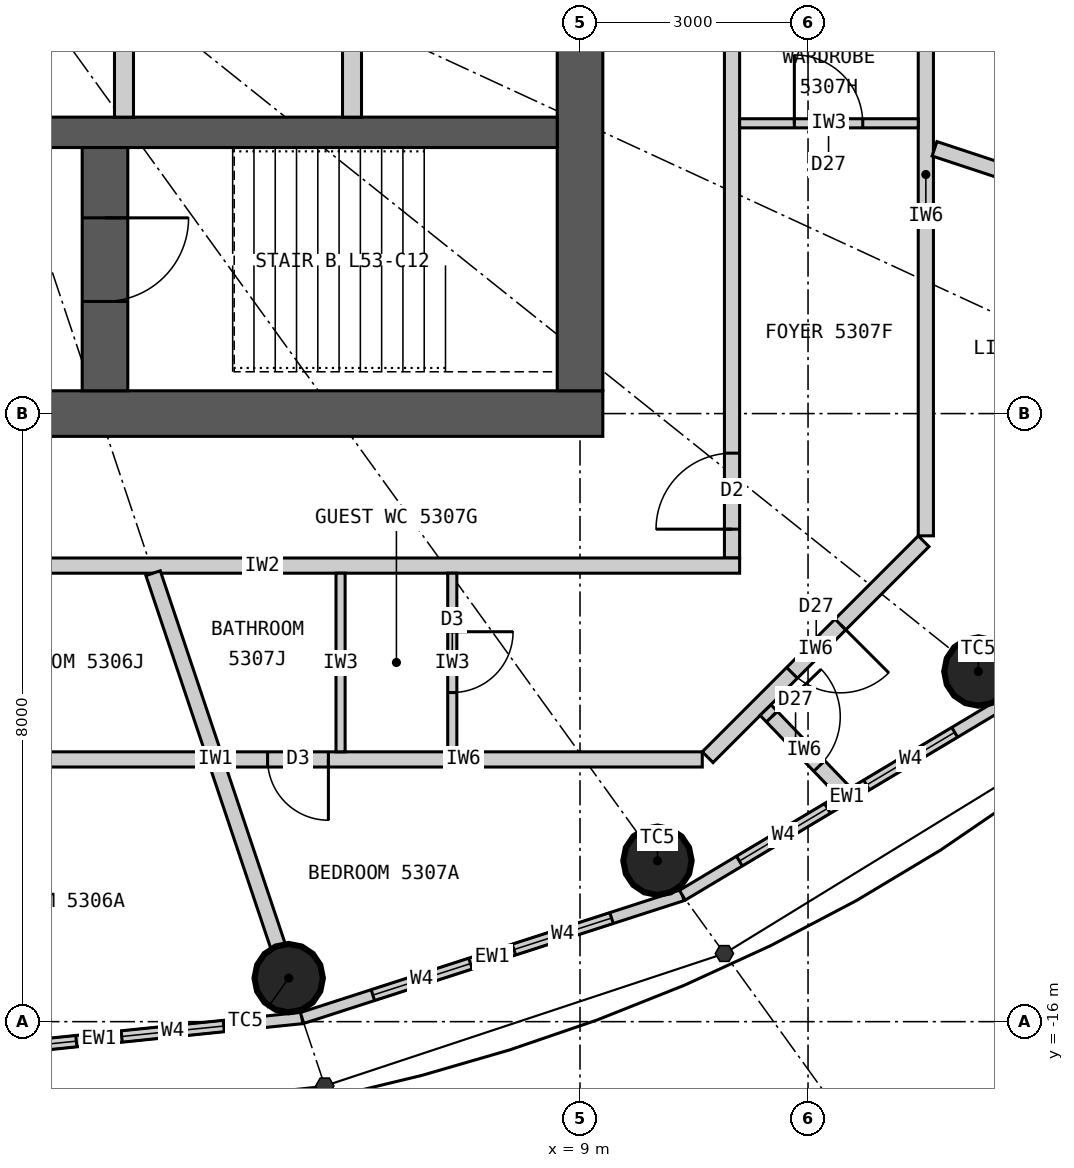
"""IFC4 building model, lengths in metres.
Left out: names, types, materials, properties, quantities, classifications, styles, units other than length and angle.
Written with IfcOpenShell. Run it as: python <this file> out.ifc"""

import sys

from ifc_helpers import new_model, si_unit, direction, frame, frame_2d, origin, origin_2d, place, context, subcontext, project, spatial, rectangle, circle, extrude, element, fill, save


model = new_model("IFC4")
c1 = context("Model", 3, precision=1e-05, world=origin(), true_north=direction((0.0, 1.0)))
c2 = subcontext(c1, "Body", "Model", "MODEL_VIEW")
j1 = project(units=[si_unit("LENGTHUNIT", "METRE"), si_unit("PLANEANGLEUNIT", "RADIAN")], contexts=[c1])
p1 = place(None, origin())
s1 = spatial("IfcSite", under=j1, at=p1, CompositionType="ELEMENT")
p2 = place(p1, origin())
s2 = spatial("IfcBuilding", under=s1, at=p2, CompositionType="ELEMENT")
p3 = place(p2, frame((0.0, 0.0, 199.5)))
s3 = spatial("IfcBuildingStorey", under=s2, at=p3, CompositionType="ELEMENT", Elevation=199.5)
for number, where, z_axis, x_axis in (
    (1, (5.167, -15.427, 0.0), (0.0, 0.0, 1.0), (1.0, 0.0, 0.0)),
    (2, (10.019, -13.883, 0.0), (0.0, 0.0, 1.0), (1.0, 0.0, 0.0)),
    (3, (14.241, -11.393, 0.0), (0.0, 0.0, 1.0), (1.0, 0.0, 0.0)),
):
    element("IfcColumn", number, at=place(p3, frame(where, z_axis=z_axis, x_axis=x_axis)), inside=s3, PredefinedType="COLUMN", context=c2, shape_type="SweptSolid", body=[
        extrude(circle(Radius=0.45, at=origin_2d()), origin(), (0.0, 0.0, 1.0), 3.3),
    ])
p4 = place(p3, frame((9.3, -8.0, 0.0), z_axis=(0.0, 0.0, 1.0), x_axis=(-1.0, 0.0, 0.0)))
e4 = element("IfcWall", 4, at=p4, inside=s3, PredefinedType="SHEAR", context=c2, shape_type="SweptSolid", body=[
    extrude(rectangle(XDim=18.6, YDim=0.6, at=frame_2d((9.3, 0.0))), origin(), (0.0, 0.0, 1.0), 3.3),
])
p5 = place(p4, frame((8.0, 0.0, 0.0)))
e5 = element("IfcOpeningElement", 5, at=p5, cuts=e4, PredefinedType="OPENING", context=c2, shape_type="SweptSolid", body=[
    extrude(rectangle(XDim=1.2, YDim=2.2, at=frame_2d((0.6, 1.1))), frame((0.0, 0.31, 0.0), z_axis=(0.0, -1.0, 0.0), x_axis=(1.0, 0.0, 0.0)), (0.0, 0.0, 1.0), 0.62),
])
p6 = place(p4, frame((15.6, 0.0, 0.0)))
e6 = element("IfcOpeningElement", 6, at=p6, cuts=e4, PredefinedType="OPENING", context=c2, shape_type="SweptSolid", body=[
    extrude(rectangle(XDim=0.9, YDim=2.2, at=frame_2d((0.45, 1.1))), frame((0.0, 0.31, 0.0), z_axis=(0.0, -1.0, 0.0), x_axis=(1.0, 0.0, 0.0)), (0.0, 0.0, 1.0), 0.62),
])
p7 = place(p3, frame((9.0, -7.7, 0.0), z_axis=(0.0, 0.0, 1.0), x_axis=(0.0, 1.0, 0.0)))
e7 = element("IfcWall", 7, at=p7, inside=s3, PredefinedType="SHEAR", context=c2, shape_type="SweptSolid", body=[
    extrude(rectangle(XDim=15.4, YDim=0.6, at=frame_2d((7.7, 0.0))), origin(), (0.0, 0.0, 1.0), 3.3),
])
p8 = place(p7, frame((6.8, 0.0, 0.0)))
e8 = element("IfcOpeningElement", 8, at=p8, cuts=e7, PredefinedType="OPENING", context=c2, shape_type="SweptSolid", body=[
    extrude(rectangle(XDim=1.8, YDim=2.2, at=frame_2d((0.9, 1.1))), frame((0.0, 0.31, 0.0), z_axis=(0.0, -1.0, 0.0), x_axis=(1.0, 0.0, 0.0)), (0.0, 0.0, 1.0), 0.62),
])
p9 = place(p3, frame((-8.7, -4.3, 0.0), z_axis=(0.0, 0.0, 1.0), x_axis=(1.0, 0.0, 0.0)))
e9 = element("IfcWall", 9, at=p9, inside=s3, PredefinedType="SHEAR", context=c2, shape_type="SweptSolid", body=[
    extrude(rectangle(XDim=17.4, YDim=0.4, at=frame_2d((8.7, 0.0))), origin(), (0.0, 0.0, 1.0), 3.3),
])
p10 = place(p3, frame((2.75, -7.7, 0.0), z_axis=(0.0, 0.0, 1.0), x_axis=(0.0, 1.0, 0.0)))
e10 = element("IfcWall", 10, at=p10, inside=s3, PredefinedType="SHEAR", context=c2, shape_type="SweptSolid", body=[
    extrude(rectangle(XDim=3.2, YDim=0.6, at=frame_2d((1.6, 0.0))), origin(), (0.0, 0.0, 1.0), 3.3),
])
p11 = place(p10, frame((1.175, 0.0, 0.0)))
e11 = element("IfcOpeningElement", 11, at=p11, cuts=e10, PredefinedType="OPENING", context=c2, shape_type="SweptSolid", body=[
    extrude(rectangle(XDim=1.1, YDim=2.2, at=frame_2d((0.55, 1.1))), frame((0.0, 0.31, 0.0), z_axis=(0.0, -1.0, 0.0), x_axis=(1.0, 0.0, 0.0)), (0.0, 0.0, 1.0), 0.62),
])
for number, where, z_axis, x_axis in (
    (12, (3.0, -4.1, 0.0), (0.0, 0.0, 1.0), (0.0, 1.0, 0.0)),
    (13, (6.0, -4.1, 0.0), (0.0, 0.0, 1.0), (0.0, 1.0, 0.0)),
):
    element("IfcWall", number, at=place(p3, frame(where, z_axis=z_axis, x_axis=x_axis)), inside=s3, PredefinedType="PARTITIONING", context=c2, shape_type="SweptSolid", body=[
        extrude(rectangle(XDim=2.35, YDim=0.25, at=frame_2d((1.175, 0.0))), origin(), (0.0, 0.0, 1.0), 3.3),
    ])
p12 = place(p3, frame((0.0, -16.5, 0.0), z_axis=(0.0, 0.0, 1.0), x_axis=(0.994774574972, 0.102095763818, 0.0)))
e14 = element("IfcWall", 14, at=p12, inside=s3, PredefinedType="ELEMENTEDWALL", context=c2, shape_type="SweptSolid", body=[
    extrude(rectangle(XDim=5.371, YDim=0.15, at=frame_2d((2.686, 0.0))), origin(), (0.0, 0.0, 1.0), 3.12),
])
p13 = place(p12, frame((1.035, 0.0, 0.9)))
e15 = element("IfcOpeningElement", 15, at=p13, cuts=e14, PredefinedType="OPENING", context=c2, shape_type="SweptSolid", body=[
    extrude(rectangle(XDim=1.35, YDim=1.9, at=frame_2d((0.675, 0.95))), frame((0.0, 0.085, 0.0), z_axis=(0.0, -1.0, 0.0), x_axis=(1.0, 0.0, 0.0)), (0.0, 0.0, 1.0), 0.17),
])
p14 = place(p12, frame((2.985, 0.0, 0.9)))
e16 = element("IfcOpeningElement", 16, at=p14, cuts=e14, PredefinedType="OPENING", context=c2, shape_type="SweptSolid", body=[
    extrude(rectangle(XDim=1.35, YDim=1.9, at=frame_2d((0.675, 0.95))), frame((0.0, 0.085, 0.0), z_axis=(0.0, -1.0, 0.0), x_axis=(1.0, 0.0, 0.0)), (0.0, 0.0, 1.0), 0.17),
])
p15 = place(p3, frame((5.343, -15.952, 0.0), z_axis=(0.0, 0.0, 1.0), x_axis=(0.951644702515, 0.307200846638, 0.0)))
e17 = element("IfcWall", 17, at=p15, inside=s3, PredefinedType="ELEMENTEDWALL", context=c2, shape_type="SweptSolid", body=[
    extrude(rectangle(XDim=5.258, YDim=0.15, at=frame_2d((2.629, 0.0))), origin(), (0.0, 0.0, 1.0), 3.12),
])
p16 = place(p15, frame((0.979, 0.0, 0.9)))
e18 = element("IfcOpeningElement", 18, at=p16, cuts=e17, PredefinedType="OPENING", context=c2, shape_type="SweptSolid", body=[
    extrude(rectangle(XDim=1.35, YDim=1.9, at=frame_2d((0.675, 0.95))), frame((0.0, 0.085, 0.0), z_axis=(0.0, -1.0, 0.0), x_axis=(1.0, 0.0, 0.0)), (0.0, 0.0, 1.0), 0.17),
])
p17 = place(p15, frame((2.929, 0.0, 0.9)))
e19 = element("IfcOpeningElement", 19, at=p17, cuts=e17, PredefinedType="OPENING", context=c2, shape_type="SweptSolid", body=[
    extrude(rectangle(XDim=1.35, YDim=1.9, at=frame_2d((0.675, 0.95))), frame((0.0, 0.085, 0.0), z_axis=(0.0, -1.0, 0.0), x_axis=(1.0, 0.0, 0.0)), (0.0, 0.0, 1.0), 0.17),
])
p18 = place(p3, frame((10.346, -14.336, 0.0), z_axis=(0.0, 0.0, 1.0), x_axis=(0.85822150553, 0.513279502265, 0.0)))
e20 = element("IfcWall", 20, at=p18, inside=s3, PredefinedType="ELEMENTEDWALL", context=c2, shape_type="SweptSolid", body=[
    extrude(rectangle(XDim=5.05, YDim=0.15, at=frame_2d((2.525, 0.0))), origin(), (0.0, 0.0, 1.0), 3.12),
])
p19 = place(p18, frame((0.875, 0.0, 0.9)))
e21 = element("IfcOpeningElement", 21, at=p19, cuts=e20, PredefinedType="OPENING", context=c2, shape_type="SweptSolid", body=[
    extrude(rectangle(XDim=1.35, YDim=1.9, at=frame_2d((0.675, 0.95))), frame((0.0, 0.085, 0.0), z_axis=(0.0, -1.0, 0.0), x_axis=(1.0, 0.0, 0.0)), (0.0, 0.0, 1.0), 0.17),
])
p20 = place(p18, frame((2.825, 0.0, 0.9)))
e22 = element("IfcOpeningElement", 22, at=p20, cuts=e20, PredefinedType="OPENING", context=c2, shape_type="SweptSolid", body=[
    extrude(rectangle(XDim=1.35, YDim=1.9, at=frame_2d((0.675, 0.95))), frame((0.0, 0.085, 0.0), z_axis=(0.0, -1.0, 0.0), x_axis=(1.0, 0.0, 0.0)), (0.0, 0.0, 1.0), 0.17),
])
p21 = place(p3, frame((11.0, -9.9, 0.0), z_axis=(0.0, 0.0, 1.0), x_axis=(0.0, 1.0, 0.0)))
e23 = element("IfcWall", 23, at=p21, inside=s3, PredefinedType="PARTITIONING", context=c2, shape_type="SweptSolid", body=[
    extrude(rectangle(XDim=19.8, YDim=0.2, at=frame_2d((9.9, 0.0))), origin(), (0.0, 0.0, 1.0), 3.12),
])
p22 = place(p21, frame((10.32, 0.0, 0.0)))
e24 = element("IfcOpeningElement", 24, at=p22, cuts=e23, PredefinedType="OPENING", context=c2, shape_type="SweptSolid", body=[
    extrude(rectangle(XDim=1.0, YDim=2.2, at=frame_2d((0.5, 1.1))), frame((0.0, 0.11, 0.0), z_axis=(0.0, -1.0, 0.0), x_axis=(1.0, 0.0, 0.0)), (0.0, 0.0, 1.0), 0.22),
])
p23 = place(p21, frame((18.653, 0.0, 0.0)))
e25 = element("IfcOpeningElement", 25, at=p23, cuts=e23, PredefinedType="OPENING", context=c2, shape_type="SweptSolid", body=[
    extrude(rectangle(XDim=1.0, YDim=2.2, at=frame_2d((0.5, 1.1))), frame((0.0, 0.11, 0.0), z_axis=(0.0, -1.0, 0.0), x_axis=(1.0, 0.0, 0.0)), (0.0, 0.0, 1.0), 0.22),
])
p24 = place(p21, frame((0.379, 0.0, 0.0)))
e26 = element("IfcOpeningElement", 26, at=p24, cuts=e23, PredefinedType="OPENING", context=c2, shape_type="SweptSolid", body=[
    extrude(rectangle(XDim=1.0, YDim=2.2, at=frame_2d((0.5, 1.1))), frame((0.0, 0.11, 0.0), z_axis=(0.0, -1.0, 0.0), x_axis=(1.0, 0.0, 0.0)), (0.0, 0.0, 1.0), 0.22),
])
p25 = place(p3, frame((11.1, -10.0, 0.0), z_axis=(0.0, 0.0, 1.0), x_axis=(-1.0, 0.0, 0.0)))
e27 = element("IfcWall", 27, at=p25, inside=s3, PredefinedType="PARTITIONING", context=c2, shape_type="SweptSolid", body=[
    extrude(rectangle(XDim=12.559, YDim=0.2, at=frame_2d((6.28, 0.0))), origin(), (0.0, 0.0, 1.0), 3.12),
])
p26 = place(p3, frame((3.383, -10.1, 0.0), z_axis=(0.0, 0.0, 1.0), x_axis=(0.317602151035, -0.948224063003, 0.0)))
e28 = element("IfcWall", 28, at=p26, inside=s3, PredefinedType="PARTITIONING", context=c2, shape_type="SweptSolid", body=[
    extrude(rectangle(XDim=5.168, YDim=0.2, at=frame_2d((2.584, 0.0))), origin(), (0.0, 0.0, 1.0), 2.42),
])
p27 = place(p3, frame((-6.364, -12.55, 0.0), z_axis=(0.0, 0.0, 1.0), x_axis=(1.0, 0.0, 0.0)))
e29 = element("IfcWall", 29, at=p27, inside=s3, PredefinedType="PARTITIONING", context=c2, shape_type="SweptSolid", body=[
    extrude(rectangle(XDim=10.446, YDim=0.2, at=frame_2d((5.223, 0.0))), origin(), (0.0, 0.0, 1.0), 3.12),
])
p28 = place(p27, frame((7.202, 0.0, 0.0)))
e30 = element("IfcOpeningElement", 30, at=p28, cuts=e29, PredefinedType="OPENING", context=c2, shape_type="SweptSolid", body=[
    extrude(rectangle(XDim=0.8, YDim=2.1, at=frame_2d((0.4, 1.05))), frame((0.0, 0.11, 0.0), z_axis=(0.0, -1.0, 0.0), x_axis=(1.0, 0.0, 0.0)), (0.0, 0.0, 1.0), 0.22),
])
p29 = place(p27, frame((3.895, 0.0, 0.0)))
e31 = element("IfcOpeningElement", 31, at=p29, cuts=e29, PredefinedType="OPENING", context=c2, shape_type="SweptSolid", body=[
    extrude(rectangle(XDim=0.9, YDim=2.1, at=frame_2d((0.45, 1.05))), frame((0.0, 0.11, 0.0), z_axis=(0.0, -1.0, 0.0), x_axis=(1.0, 0.0, 0.0)), (0.0, 0.0, 1.0), 0.22),
])
p30 = place(p3, frame((4.325, -12.55, 0.0), z_axis=(0.0, 0.0, 1.0), x_axis=(1.0, 0.0, 0.0)))
e32 = element("IfcWall", 32, at=p30, inside=s3, PredefinedType="PARTITIONING", context=c2, shape_type="SweptSolid", body=[
    extrude(rectangle(XDim=6.284, YDim=0.2, at=frame_2d((3.142, 0.0))), origin(), (0.0, 0.0, 1.0), 3.12),
])
p31 = place(p30, frame((0.564, 0.0, 0.0)))
e33 = element("IfcOpeningElement", 33, at=p31, cuts=e32, PredefinedType="OPENING", context=c2, shape_type="SweptSolid", body=[
    extrude(rectangle(XDim=0.8, YDim=2.1, at=frame_2d((0.4, 1.05))), frame((0.0, 0.11, 0.0), z_axis=(0.0, -1.0, 0.0), x_axis=(1.0, 0.0, 0.0)), (0.0, 0.0, 1.0), 0.22),
])
p32 = place(p3, frame((10.679, -12.521, 0.0), z_axis=(0.0, 0.0, 1.0), x_axis=(0.707106781187, 0.707106781187, 0.0)))
e34 = element("IfcWall", 34, at=p32, inside=s3, PredefinedType="PARTITIONING", context=c2, shape_type="SweptSolid", body=[
    extrude(rectangle(XDim=4.019, YDim=0.2, at=frame_2d((2.009, 0.0))), origin(), (0.0, 0.0, 1.0), 3.12),
])
p33 = place(p32, frame((1.57, 0.0, 0.0)))
e35 = element("IfcOpeningElement", 35, at=p33, cuts=e34, PredefinedType="OPENING", context=c2, shape_type="SweptSolid", body=[
    extrude(rectangle(XDim=0.9, YDim=2.1, at=frame_2d((0.45, 1.05))), frame((0.0, 0.11, 0.0), z_axis=(0.0, -1.0, 0.0), x_axis=(1.0, 0.0, 0.0)), (0.0, 0.0, 1.0), 0.22),
])
p34 = place(p3, frame((13.55, -9.609, 0.0), z_axis=(0.0, 0.0, 1.0), x_axis=(0.0, 1.0, 0.0)))
e36 = element("IfcWall", 36, at=p34, inside=s3, PredefinedType="PARTITIONING", context=c2, shape_type="SweptSolid", body=[
    extrude(rectangle(XDim=9.508, YDim=0.2, at=frame_2d((4.754, 0.0))), origin(), (0.0, 0.0, 1.0), 3.12),
])
p35 = place(p34, frame((7.308, 0.0, 0.0)))
e37 = element("IfcOpeningElement", 37, at=p35, cuts=e36, PredefinedType="OPENING", context=c2, shape_type="SweptSolid", body=[
    extrude(rectangle(XDim=0.8, YDim=2.1, at=frame_2d((0.4, 1.05))), frame((0.0, 0.11, 0.0), z_axis=(0.0, -1.0, 0.0), x_axis=(1.0, 0.0, 0.0)), (0.0, 0.0, 1.0), 0.22),
])
p36 = place(p3, frame((11.441, -11.9, 0.0), z_axis=(0.0, 0.0, 1.0), x_axis=(0.692958717259, -0.720977264672, 0.0)))
e38 = element("IfcWall", 38, at=p36, inside=s3, PredefinedType="PARTITIONING", context=c2, shape_type="SweptSolid", body=[
    extrude(rectangle(XDim=1.464, YDim=0.2, at=frame_2d((0.732, 0.0))), origin(), (0.0, 0.0, 1.0), 3.12),
])
p37 = place(p36, frame((0.12, 0.0, 0.0)))
e39 = element("IfcOpeningElement", 39, at=p37, cuts=e38, PredefinedType="OPENING", context=c2, shape_type="SweptSolid", body=[
    extrude(rectangle(XDim=0.9, YDim=2.1, at=frame_2d((0.45, 1.05))), frame((0.0, 0.11, 0.0), z_axis=(0.0, -1.0, 0.0), x_axis=(1.0, 0.0, 0.0)), (0.0, 0.0, 1.0), 0.22),
])
p38 = place(p3, frame((13.664, -4.516, 0.0), z_axis=(0.0, 0.0, 1.0), x_axis=(0.949481375941, -0.313823384632, 0.0)))
e40 = element("IfcWall", 40, at=p38, inside=s3, PredefinedType="PARTITIONING", context=c2, shape_type="SweptSolid", body=[
    extrude(rectangle(XDim=5.638, YDim=0.2, at=frame_2d((2.819, 0.0))), origin(), (0.0, 0.0, 1.0), 3.12),
])
p39 = place(p38, frame((1.82, 0.0, 0.0)))
e41 = element("IfcOpeningElement", 41, at=p39, cuts=e40, PredefinedType="OPENING", context=c2, shape_type="SweptSolid", body=[
    extrude(rectangle(XDim=0.9, YDim=2.1, at=frame_2d((0.45, 1.05))), frame((0.0, 0.11, 0.0), z_axis=(0.0, -1.0, 0.0), x_axis=(1.0, 0.0, 0.0)), (0.0, 0.0, 1.0), 0.22),
])
p40 = place(p3, frame((5.849, -10.1, 0.0), z_axis=(0.0, 0.0, 1.0), x_axis=(0.0, -1.0, 0.0)))
e42 = element("IfcWall", 42, at=p40, inside=s3, PredefinedType="PARTITIONING", context=c2, shape_type="SweptSolid", body=[
    extrude(rectangle(XDim=2.35, YDim=0.12, at=frame_2d((1.175, 0.0))), origin(), (0.0, 0.0, 1.0), 3.12),
])
p41 = place(p3, frame((7.319, -10.1, 0.0), z_axis=(0.0, 0.0, 1.0), x_axis=(0.0, -1.0, 0.0)))
e43 = element("IfcWall", 43, at=p41, inside=s3, PredefinedType="PARTITIONING", context=c2, shape_type="SweptSolid", body=[
    extrude(rectangle(XDim=2.35, YDim=0.12, at=frame_2d((1.175, 0.0))), origin(), (0.0, 0.0, 1.0), 3.12),
])
p42 = place(p41, frame((0.77, 0.0, 0.0)))
e44 = element("IfcOpeningElement", 44, at=p42, cuts=e43, PredefinedType="OPENING", context=c2, shape_type="SweptSolid", body=[
    extrude(rectangle(XDim=0.8, YDim=2.1, at=frame_2d((0.4, 1.05))), frame((0.0, 0.07, 0.0), z_axis=(0.0, -1.0, 0.0), x_axis=(1.0, 0.0, 0.0)), (0.0, 0.0, 1.0), 0.14),
])
p43 = place(p3, frame((11.1, -4.181, 0.0), z_axis=(0.0, 0.0, 1.0), x_axis=(1.0, 0.0, 0.0)))
e45 = element("IfcWall", 45, at=p43, inside=s3, PredefinedType="PARTITIONING", context=c2, shape_type="SweptSolid", body=[
    extrude(rectangle(XDim=2.35, YDim=0.12, at=frame_2d((1.175, 0.0))), origin(), (0.0, 0.0, 1.0), 3.12),
])
p44 = place(p43, frame((0.72, 0.0, 0.0)))
e46 = element("IfcOpeningElement", 46, at=p44, cuts=e45, PredefinedType="OPENING", context=c2, shape_type="SweptSolid", body=[
    extrude(rectangle(XDim=0.9, YDim=2.1, at=frame_2d((0.45, 1.05))), frame((0.0, 0.07, 0.0), z_axis=(0.0, -1.0, 0.0), x_axis=(1.0, 0.0, 0.0)), (0.0, 0.0, 1.0), 0.14),
])
p45 = place(p13, origin())
e47 = element("IfcWindow", 47, at=p45, inside=s3, PartitioningType="SINGLE_PANEL", PredefinedType="WINDOW", context=c2, shape_type="SweptSolid", body=[
    extrude(rectangle(XDim=1.35, YDim=1.9, at=frame_2d((0.675, 0.95))), frame((0.0, 0.03, 0.0), z_axis=(0.0, -1.0, 0.0), x_axis=(1.0, 0.0, 0.0)), (0.0, 0.0, 1.0), 0.06),
])
fill(e15, e47)
p46 = place(p14, origin())
e48 = element("IfcWindow", 48, at=p46, inside=s3, PartitioningType="SINGLE_PANEL", PredefinedType="WINDOW", context=c2, shape_type="SweptSolid", body=[
    extrude(rectangle(XDim=1.35, YDim=1.9, at=frame_2d((0.675, 0.95))), frame((0.0, 0.03, 0.0), z_axis=(0.0, -1.0, 0.0), x_axis=(1.0, 0.0, 0.0)), (0.0, 0.0, 1.0), 0.06),
])
fill(e16, e48)
p47 = place(p16, origin())
e49 = element("IfcWindow", 49, at=p47, inside=s3, PartitioningType="SINGLE_PANEL", PredefinedType="WINDOW", context=c2, shape_type="SweptSolid", body=[
    extrude(rectangle(XDim=1.35, YDim=1.9, at=frame_2d((0.675, 0.95))), frame((0.0, 0.03, 0.0), z_axis=(0.0, -1.0, 0.0), x_axis=(1.0, 0.0, 0.0)), (0.0, 0.0, 1.0), 0.06),
])
fill(e18, e49)
p48 = place(p17, origin())
e50 = element("IfcWindow", 50, at=p48, inside=s3, PartitioningType="SINGLE_PANEL", PredefinedType="WINDOW", context=c2, shape_type="SweptSolid", body=[
    extrude(rectangle(XDim=1.35, YDim=1.9, at=frame_2d((0.675, 0.95))), frame((0.0, 0.03, 0.0), z_axis=(0.0, -1.0, 0.0), x_axis=(1.0, 0.0, 0.0)), (0.0, 0.0, 1.0), 0.06),
])
fill(e19, e50)
p49 = place(p19, origin())
e51 = element("IfcWindow", 51, at=p49, inside=s3, PartitioningType="SINGLE_PANEL", PredefinedType="WINDOW", context=c2, shape_type="SweptSolid", body=[
    extrude(rectangle(XDim=1.35, YDim=1.9, at=frame_2d((0.675, 0.95))), frame((0.0, 0.03, 0.0), z_axis=(0.0, -1.0, 0.0), x_axis=(1.0, 0.0, 0.0)), (0.0, 0.0, 1.0), 0.06),
])
fill(e21, e51)
p50 = place(p20, origin())
e52 = element("IfcWindow", 52, at=p50, inside=s3, PartitioningType="SINGLE_PANEL", PredefinedType="WINDOW", context=c2, shape_type="SweptSolid", body=[
    extrude(rectangle(XDim=1.35, YDim=1.9, at=frame_2d((0.675, 0.95))), frame((0.0, 0.03, 0.0), z_axis=(0.0, -1.0, 0.0), x_axis=(1.0, 0.0, 0.0)), (0.0, 0.0, 1.0), 0.06),
])
fill(e22, e52)
p51 = place(p24, origin())
e53 = element("IfcDoor", 53, at=p51, inside=s3, OperationType="SINGLE_SWING_LEFT", PredefinedType="DOOR", context=c2, shape_type="SweptSolid", body=[
    extrude(rectangle(XDim=1.0, YDim=2.2, at=frame_2d((0.5, 1.1))), frame((0.0, 0.025, 0.0), z_axis=(0.0, -1.0, 0.0), x_axis=(1.0, 0.0, 0.0)), (0.0, 0.0, 1.0), 0.05),
])
fill(e26, e53)
p52 = place(p31, origin())
e54 = element("IfcDoor", 54, at=p52, inside=s3, OperationType="SINGLE_SWING_RIGHT", PredefinedType="DOOR", context=c2, shape_type="SweptSolid", body=[
    extrude(rectangle(XDim=0.8, YDim=2.1, at=frame_2d((0.4, 1.05))), frame((0.0, 0.025, 0.0), z_axis=(0.0, -1.0, 0.0), x_axis=(1.0, 0.0, 0.0)), (0.0, 0.0, 1.0), 0.05),
])
fill(e33, e54)
p53 = place(p42, origin())
e55 = element("IfcDoor", 55, at=p53, inside=s3, OperationType="SINGLE_SWING_LEFT", PredefinedType="DOOR", context=c2, shape_type="SweptSolid", body=[
    extrude(rectangle(XDim=0.8, YDim=2.1, at=frame_2d((0.4, 1.05))), frame((0.0, 0.025, 0.0), z_axis=(0.0, -1.0, 0.0), x_axis=(1.0, 0.0, 0.0)), (0.0, 0.0, 1.0), 0.05),
])
fill(e44, e55)
p54 = place(p44, origin())
e56 = element("IfcDoor", 56, at=p54, inside=s3, OperationType="SINGLE_SWING_LEFT", PredefinedType="DOOR", context=c2, shape_type="SweptSolid", body=[
    extrude(rectangle(XDim=0.9, YDim=2.1, at=frame_2d((0.45, 1.05))), frame((0.0, 0.025, 0.0), z_axis=(0.0, -1.0, 0.0), x_axis=(1.0, 0.0, 0.0)), (0.0, 0.0, 1.0), 0.05),
])
fill(e46, e56)
p55 = place(p33, origin())
e57 = element("IfcDoor", 57, at=p55, inside=s3, OperationType="SINGLE_SWING_RIGHT", PredefinedType="DOOR", context=c2, shape_type="SweptSolid", body=[
    extrude(rectangle(XDim=0.9, YDim=2.1, at=frame_2d((0.45, 1.05))), frame((0.0, 0.025, 0.0), z_axis=(0.0, -1.0, 0.0), x_axis=(1.0, 0.0, 0.0)), (0.0, 0.0, 1.0), 0.05),
])
fill(e35, e57)
p56 = place(p37, origin())
e58 = element("IfcDoor", 58, at=p56, inside=s3, OperationType="SINGLE_SWING_LEFT", PredefinedType="DOOR", context=c2, shape_type="SweptSolid", body=[
    extrude(rectangle(XDim=0.9, YDim=2.1, at=frame_2d((0.45, 1.05))), frame((0.0, 0.025, 0.0), z_axis=(0.0, -1.0, 0.0), x_axis=(1.0, 0.0, 0.0)), (0.0, 0.0, 1.0), 0.05),
])
fill(e39, e58)
p57 = place(p11, origin())
e59 = element("IfcDoor", 59, at=p57, inside=s3, OperationType="SINGLE_SWING_RIGHT", PredefinedType="DOOR", context=c2, shape_type="SweptSolid", body=[
    extrude(rectangle(XDim=1.1, YDim=2.2, at=frame_2d((0.55, 1.1))), frame((0.0, 0.025, 0.0), z_axis=(0.0, -1.0, 0.0), x_axis=(1.0, 0.0, 0.0)), (0.0, 0.0, 1.0), 0.05),
])
fill(e11, e59)
save(model, sys.argv[1])
